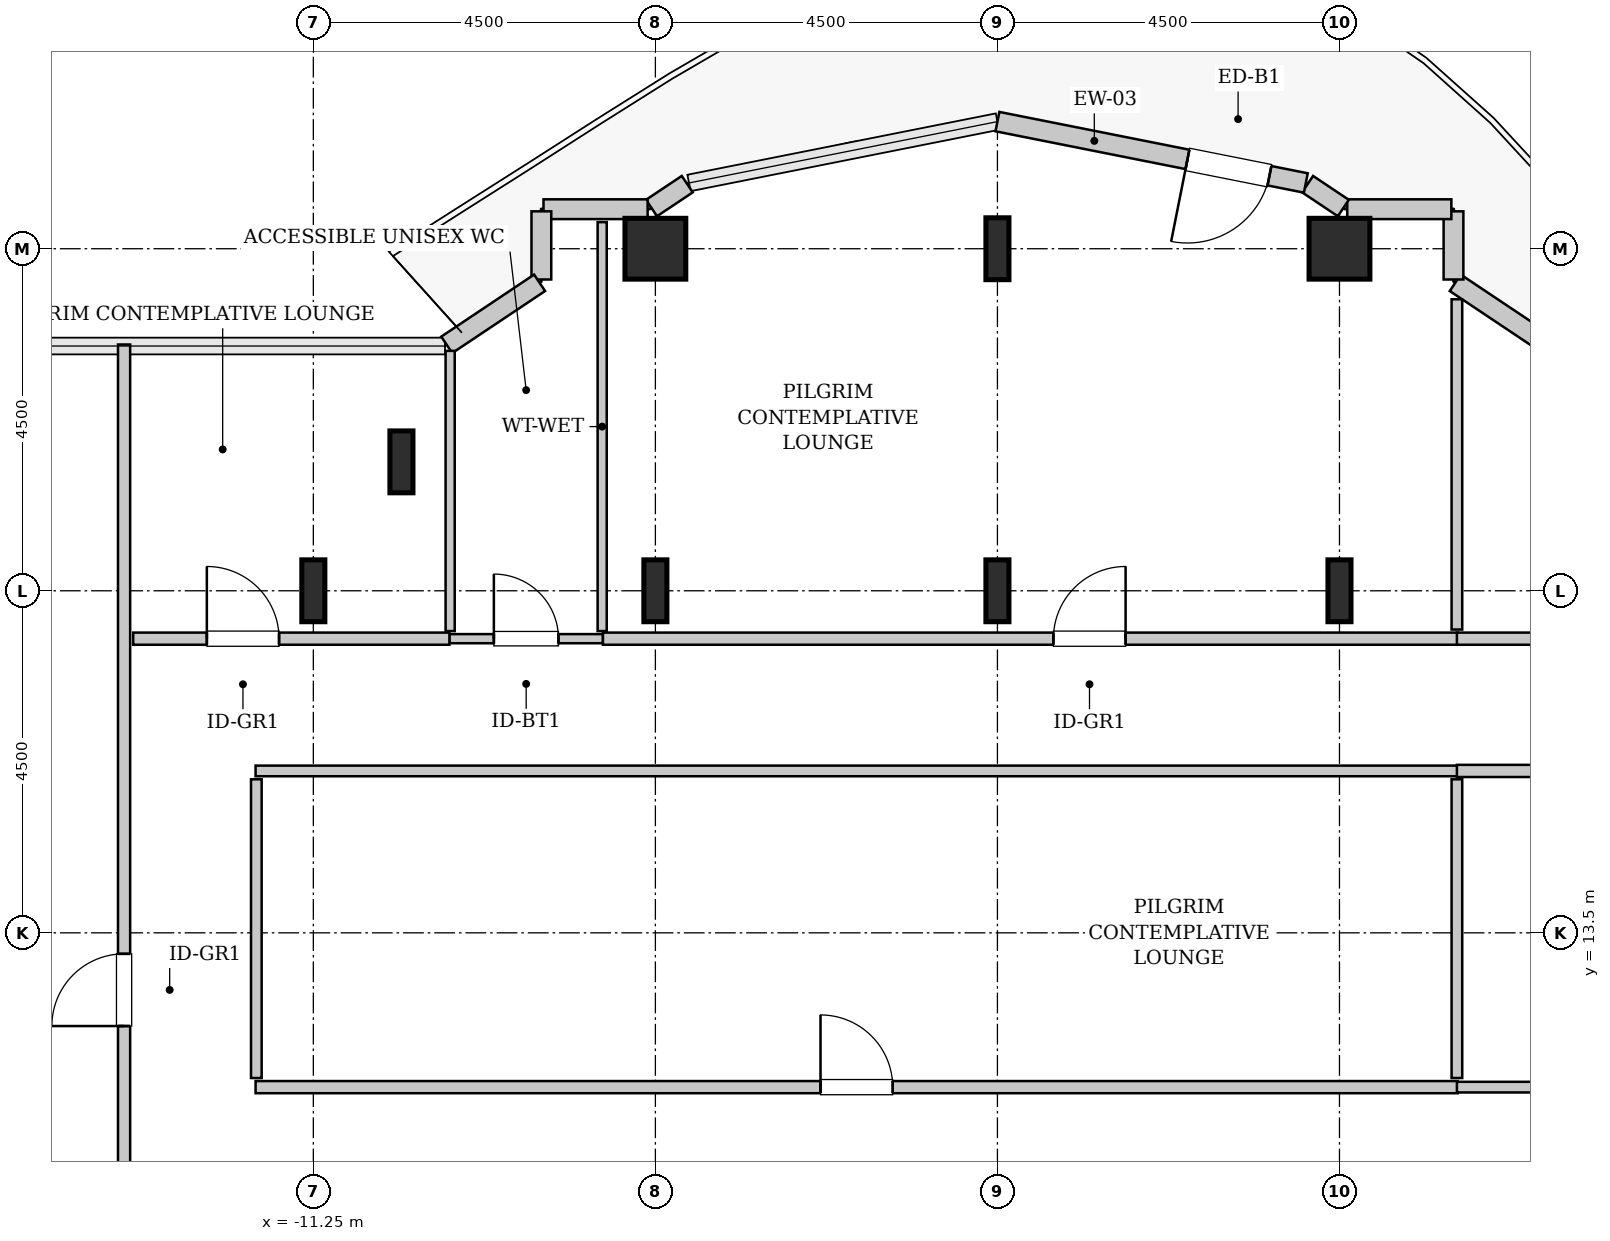
"""IFC4 building model, lengths in metres.
Left out: names, types, materials, properties, quantities, classifications, styles, units other than length and angle.
Written with IfcOpenShell. Run it as: python <this file> out.ifc"""

import sys

from ifc_helpers import new_model, si_unit, direction, frame, frame_2d, origin, origin_2d, place, context, subcontext, project, spatial, rectangle, hollow_rectangle, i_section, extrude, source, transform, mapped, element, fill, save


model = new_model("IFC4")
c1 = context("Model", 3, precision=1e-05, world=origin(), true_north=direction((0.0, 1.0)))
c2 = subcontext(c1, "Body", "Model", "MODEL_VIEW")
j1 = project(units=[si_unit("LENGTHUNIT", "METRE"), si_unit("PLANEANGLEUNIT", "RADIAN")], contexts=[c1])
p1 = place(None, origin())
s1 = spatial("IfcSite", under=j1, at=p1, CompositionType="ELEMENT")
p2 = place(p1, origin())
s2 = spatial("IfcBuilding", under=s1, at=p2, CompositionType="ELEMENT")
p3 = place(p2, frame((0.0, 0.0, 194.4)))
s3 = spatial("IfcBuildingStorey", under=s2, at=p3, CompositionType="ELEMENT", Elevation=194.4)
m1 = source(origin(), c2, "Body", "SweptSolid", [
    extrude(i_section(OverallWidth=0.303, OverallDepth=0.814, WebThickness=0.021, FlangeThickness=0.04, FilletRadius=0.03, at=origin_2d()), origin(), (0.0, 0.0, 1.0), 3.8),
])
for number, where, z_axis, x_axis in (
    (1, (-11.25, 18.0, 0.0), (0.0, 0.0, 1.0), (1.0, 0.0, 0.0)),
    (2, (-10.091, 19.696, 0.0), (0.0, 0.0, 1.0), (1.0, 0.0, 0.0)),
    (3, (-6.75, 18.0, 0.0), (0.0, 0.0, 1.0), (1.0, 0.0, 0.0)),
):
    element("IfcColumn", number, at=place(p3, frame(where, z_axis=z_axis, x_axis=x_axis)), inside=s3, PredefinedType="COLUMN", context=c2, shape_type="MappedRepresentation", body=[
        mapped(m1, transform((0.0, 0.0, 0.0), x_axis=(1.0, 0.0, 0.0), y_axis=(0.0, 1.0, 0.0), z_axis=(0.0, 0.0, 1.0), scale=1.0)),
    ])
m2 = source(origin(), c2, "Body", "SweptSolid", [
    extrude(hollow_rectangle(XDim=0.8, YDim=0.8, WallThickness=0.04, InnerFilletRadius=0.04, OuterFilletRadius=0.08, at=origin_2d()), origin(), (0.0, 0.0, 1.0), 3.8),
])
p4 = place(p3, frame((-6.75, 22.5, 0.0), z_axis=(0.0, 0.0, 1.0), x_axis=(1.0, 0.0, 0.0)))
e4 = element("IfcColumn", 4, at=p4, inside=s3, PredefinedType="COLUMN", context=c2, shape_type="MappedRepresentation", body=[
    mapped(m2, transform((0.0, 0.0, 0.0), x_axis=(1.0, 0.0, 0.0), y_axis=(0.0, 1.0, 0.0), z_axis=(0.0, 0.0, 1.0), scale=1.0)),
])
for number, where, z_axis, x_axis in (
    (5, (-2.25, 18.0, 0.0), (0.0, 0.0, 1.0), (1.0, 0.0, 0.0)),
    (6, (-2.25, 22.5, 0.0), (0.0, 0.0, 1.0), (1.0, 0.0, 0.0)),
    (7, (2.25, 18.0, 0.0), (0.0, 0.0, 1.0), (1.0, 0.0, 0.0)),
):
    element("IfcColumn", number, at=place(p3, frame(where, z_axis=z_axis, x_axis=x_axis)), inside=s3, PredefinedType="COLUMN", context=c2, shape_type="MappedRepresentation", body=[
        mapped(m1, transform((0.0, 0.0, 0.0), x_axis=(1.0, 0.0, 0.0), y_axis=(0.0, 1.0, 0.0), z_axis=(0.0, 0.0, 1.0), scale=1.0)),
    ])
p5 = place(p3, frame((2.25, 22.5, 0.0), z_axis=(0.0, 0.0, 1.0), x_axis=(1.0, 0.0, 0.0)))
e8 = element("IfcColumn", 8, at=p5, inside=s3, PredefinedType="COLUMN", context=c2, shape_type="MappedRepresentation", body=[
    mapped(m2, transform((0.0, 0.0, 0.0), x_axis=(1.0, 0.0, 0.0), y_axis=(0.0, 1.0, 0.0), z_axis=(0.0, 0.0, 1.0), scale=1.0)),
])
m3 = source(origin(), c2, "Body", "SweptSolid", [
    extrude(rectangle(XDim=1.469, YDim=0.26, at=frame_2d((0.734, 0.0))), origin(), (0.0, 0.0, 1.0), 3.55),
])
p6 = place(p3, frame((4.995, 21.236, 0.0), z_axis=(0.0, 0.0, 1.0), x_axis=(-0.831461760506, 0.555581983884, 0.0)))
e9 = element("IfcWall", 9, at=p6, inside=s3, PredefinedType="SOLIDWALL", context=c2, shape_type="MappedRepresentation", body=[
    mapped(m3, transform((0.0, 0.0, 0.0), x_axis=(1.0, 0.0, 0.0), y_axis=(0.0, 1.0, 0.0), z_axis=(0.0, 0.0, 1.0), scale=1.0)),
])
m4 = source(origin(), c2, "Body", "SweptSolid", [
    extrude(rectangle(XDim=0.897, YDim=0.26, at=frame_2d((0.448, 0.0))), origin(), (0.0, 0.0, 1.0), 3.55),
])
p7 = place(p3, frame((3.75, 22.095, 0.0), z_axis=(0.0, 0.0, 1.0), x_axis=(0.0, 1.0, 0.0)))
e10 = element("IfcWall", 10, at=p7, inside=s3, PredefinedType="SOLIDWALL", context=c2, shape_type="MappedRepresentation", body=[
    mapped(m4, transform((0.0, 0.0, 0.0), x_axis=(1.0, 0.0, 0.0), y_axis=(0.0, 1.0, 0.0), z_axis=(0.0, 0.0, 1.0), scale=1.0)),
])
m5 = source(origin(), c2, "Body", "SweptSolid", [
    extrude(rectangle(XDim=1.37, YDim=0.26, at=frame_2d((0.685, 0.0))), origin(), (0.0, 0.0, 1.0), 3.55),
])
p8 = place(p3, frame((3.722, 23.02, 0.0), z_axis=(0.0, 0.0, 1.0), x_axis=(-1.0, 0.0, 0.0)))
e11 = element("IfcWall", 11, at=p8, inside=s3, PredefinedType="SOLIDWALL", context=c2, shape_type="MappedRepresentation", body=[
    mapped(m5, transform((0.0, 0.0, 0.0), x_axis=(1.0, 0.0, 0.0), y_axis=(0.0, 1.0, 0.0), z_axis=(0.0, 0.0, 1.0), scale=1.0)),
])
m6 = source(origin(), c2, "Body", "SweptSolid", [
    extrude(rectangle(XDim=0.565, YDim=0.26, at=frame_2d((0.283, 0.0))), origin(), (0.0, 0.0, 1.0), 3.55),
])
p9 = place(p3, frame((2.301, 23.036, 0.0), z_axis=(0.0, 0.0, 1.0), x_axis=(-0.831651492666, 0.555297933317, 0.0)))
e12 = element("IfcWall", 12, at=p9, inside=s3, PredefinedType="SOLIDWALL", context=c2, shape_type="MappedRepresentation", body=[
    mapped(m6, transform((0.0, 0.0, 0.0), x_axis=(1.0, 0.0, 0.0), y_axis=(0.0, 1.0, 0.0), z_axis=(0.0, 0.0, 1.0), scale=1.0)),
])
m7 = source(origin(), c2, "Body", "SweptSolid", [
    extrude(rectangle(XDim=4.137, YDim=0.26, at=frame_2d((2.068, 0.0))), origin(), (0.0, 0.0, 1.0), 3.55),
])
p10 = place(p3, frame((1.807, 23.365, 0.0), z_axis=(0.0, 0.0, 1.0), x_axis=(-0.980782170794, 0.195105954428, 0.0)))
e13 = element("IfcWall", 13, at=p10, inside=s3, PredefinedType="SOLIDWALL", context=c2, shape_type="MappedRepresentation", body=[
    mapped(m7, transform((0.0, 0.0, 0.0), x_axis=(1.0, 0.0, 0.0), y_axis=(0.0, 1.0, 0.0), z_axis=(0.0, 0.0, 1.0), scale=1.0)),
])
p11 = place(p10, frame((0.488, 0.0, 0.0)))
e14 = element("IfcOpeningElement", 14, at=p11, cuts=e13, PredefinedType="OPENING", context=c2, shape_type="SweptSolid", body=[
    extrude(rectangle(XDim=1.1, YDim=2.2, at=frame_2d((0.55, 1.1))), frame((0.0, 0.14, 0.0), z_axis=(0.0, -1.0, 0.0), x_axis=(1.0, 0.0, 0.0)), (0.0, 0.0, 1.0), 0.28),
])
p12 = place(p3, frame((-6.331, 23.35, 0.0), z_axis=(0.0, 0.0, 1.0), x_axis=(-0.831651492666, -0.555297933317, 0.0)))
e15 = element("IfcWall", 15, at=p12, inside=s3, PredefinedType="SOLIDWALL", context=c2, shape_type="MappedRepresentation", body=[
    mapped(m6, transform((0.0, 0.0, 0.0), x_axis=(1.0, 0.0, 0.0), y_axis=(0.0, 1.0, 0.0), z_axis=(0.0, 0.0, 1.0), scale=1.0)),
])
p13 = place(p3, frame((-6.852, 23.02, 0.0), z_axis=(0.0, 0.0, 1.0), x_axis=(-1.0, 0.0, 0.0)))
e16 = element("IfcWall", 16, at=p13, inside=s3, PredefinedType="SOLIDWALL", context=c2, shape_type="MappedRepresentation", body=[
    mapped(m5, transform((0.0, 0.0, 0.0), x_axis=(1.0, 0.0, 0.0), y_axis=(0.0, 1.0, 0.0), z_axis=(0.0, 0.0, 1.0), scale=1.0)),
])
p14 = place(p3, frame((-8.25, 22.992, 0.0), z_axis=(0.0, 0.0, 1.0), x_axis=(0.0, -1.0, 0.0)))
e17 = element("IfcWall", 17, at=p14, inside=s3, PredefinedType="SOLIDWALL", context=c2, shape_type="MappedRepresentation", body=[
    mapped(m4, transform((0.0, 0.0, 0.0), x_axis=(1.0, 0.0, 0.0), y_axis=(0.0, 1.0, 0.0), z_axis=(0.0, 0.0, 1.0), scale=1.0)),
])
p15 = place(p3, frame((-8.273, 22.052, 0.0), z_axis=(0.0, 0.0, 1.0), x_axis=(-0.831461760506, -0.555581983884, 0.0)))
e18 = element("IfcWall", 18, at=p15, inside=s3, PredefinedType="SOLIDWALL", context=c2, shape_type="MappedRepresentation", body=[
    mapped(m3, transform((0.0, 0.0, 0.0), x_axis=(1.0, 0.0, 0.0), y_axis=(0.0, 1.0, 0.0), z_axis=(0.0, 0.0, 1.0), scale=1.0)),
])
m8 = source(origin(), c2, "Body", "SweptSolid", [
    extrude(rectangle(XDim=2.02, YDim=0.12, at=frame_2d((1.01, 0.0))), origin(), (0.0, 0.0, 1.0), 3.535),
])
p16 = place(p3, frame((-9.46, 17.37, 0.0), z_axis=(0.0, 0.0, 1.0), x_axis=(1.0, 0.0, 0.0)))
e19 = element("IfcWall", 19, at=p16, inside=s3, PredefinedType="PLUMBINGWALL", context=c2, shape_type="MappedRepresentation", body=[
    mapped(m8, transform((0.0, 0.0, 0.0), x_axis=(1.0, 0.0, 0.0), y_axis=(0.0, 1.0, 0.0), z_axis=(0.0, 0.0, 1.0), scale=1.0)),
])
p17 = place(p16, frame((0.585, 0.0, 0.0)))
e20 = element("IfcOpeningElement", 20, at=p17, cuts=e19, PredefinedType="OPENING", context=c2, shape_type="SweptSolid", body=[
    extrude(rectangle(XDim=0.85, YDim=2.1, at=frame_2d((0.425, 1.05))), frame((0.0, 0.07, 0.0), z_axis=(0.0, -1.0, 0.0), x_axis=(1.0, 0.0, 0.0)), (0.0, 0.0, 1.0), 0.14),
])
m9 = source(origin(), c2, "Body", "SweptSolid", [
    extrude(rectangle(XDim=5.38, YDim=0.12, at=frame_2d((2.69, 0.0))), origin(), (0.0, 0.0, 1.0), 3.535),
])
p18 = place(p3, frame((-7.45, 17.47, 0.0), z_axis=(0.0, 0.0, 1.0), x_axis=(0.0, 1.0, 0.0)))
e21 = element("IfcWall", 21, at=p18, inside=s3, PredefinedType="PLUMBINGWALL", context=c2, shape_type="MappedRepresentation", body=[
    mapped(m9, transform((0.0, 0.0, 0.0), x_axis=(1.0, 0.0, 0.0), y_axis=(0.0, 1.0, 0.0), z_axis=(0.0, 0.0, 1.0), scale=1.0)),
])
m10 = source(origin(), c2, "Body", "SweptSolid", [
    extrude(rectangle(XDim=3.687, YDim=0.12, at=frame_2d((1.843, 0.0))), origin(), (0.0, 0.0, 1.0), 3.535),
])
p19 = place(p3, frame((-9.45, 17.47, 0.0), z_axis=(0.0, 0.0, 1.0), x_axis=(0.0, 1.0, 0.0)))
e22 = element("IfcWall", 22, at=p19, inside=s3, PredefinedType="PLUMBINGWALL", context=c2, shape_type="MappedRepresentation", body=[
    mapped(m10, transform((0.0, 0.0, 0.0), x_axis=(1.0, 0.0, 0.0), y_axis=(0.0, 1.0, 0.0), z_axis=(0.0, 0.0, 1.0), scale=1.0)),
])
m11 = source(origin(), c2, "Body", "SweptSolid", [
    extrude(rectangle(XDim=13.153, YDim=0.16, at=frame_2d((6.576, 0.0))), origin(), (0.0, 0.0, 1.0), 3.535),
])
p20 = place(p3, frame((-13.74, 8.087, 0.0), z_axis=(0.0, 0.0, 1.0), x_axis=(0.0, 1.0, 0.0)))
e23 = element("IfcWall", 23, at=p20, inside=s3, PredefinedType="PARTITIONING", context=c2, shape_type="MappedRepresentation", body=[
    mapped(m11, transform((0.0, 0.0, 0.0), x_axis=(1.0, 0.0, 0.0), y_axis=(0.0, 1.0, 0.0), z_axis=(0.0, 0.0, 1.0), scale=1.0)),
])
p21 = place(p20, frame((4.186, 0.0, 0.0)))
e24 = element("IfcOpeningElement", 24, at=p21, cuts=e23, PredefinedType="OPENING", context=c2, shape_type="SweptSolid", body=[
    extrude(rectangle(XDim=0.95, YDim=2.1, at=frame_2d((0.475, 1.05))), frame((0.0, 0.09, 0.0), z_axis=(0.0, -1.0, 0.0), x_axis=(1.0, 0.0, 0.0)), (0.0, 0.0, 1.0), 0.18),
])
m12 = source(origin(), c2, "Body", "SweptSolid", [
    extrude(rectangle(XDim=15.815, YDim=0.16, at=frame_2d((7.907, 0.0))), origin(), (0.0, 0.0, 1.0), 3.535),
])
p22 = place(p3, frame((-12.01, 11.47, 0.0), z_axis=(0.0, 0.0, 1.0), x_axis=(1.0, 0.0, 0.0)))
e25 = element("IfcWall", 25, at=p22, inside=s3, PredefinedType="PARTITIONING", context=c2, shape_type="MappedRepresentation", body=[
    mapped(m12, transform((0.0, 0.0, 0.0), x_axis=(1.0, 0.0, 0.0), y_axis=(0.0, 1.0, 0.0), z_axis=(0.0, 0.0, 1.0), scale=1.0)),
])
p23 = place(p22, frame((7.433, 0.0, 0.0)))
e26 = element("IfcOpeningElement", 26, at=p23, cuts=e25, PredefinedType="OPENING", context=c2, shape_type="SweptSolid", body=[
    extrude(rectangle(XDim=0.95, YDim=2.1, at=frame_2d((0.475, 1.05))), frame((0.0, 0.09, 0.0), z_axis=(0.0, -1.0, 0.0), x_axis=(1.0, 0.0, 0.0)), (0.0, 0.0, 1.0), 0.18),
])
m13 = source(origin(), c2, "Body", "SweptSolid", [
    extrude(rectangle(XDim=15.815, YDim=0.14, at=frame_2d((7.907, 0.0))), origin(), (0.0, 0.0, 1.0), 3.535),
])
p24 = place(p3, frame((-12.01, 15.63, 0.0), z_axis=(0.0, 0.0, 1.0), x_axis=(1.0, 0.0, 0.0)))
e27 = element("IfcWall", 27, at=p24, inside=s3, PredefinedType="PARTITIONING", context=c2, shape_type="MappedRepresentation", body=[
    mapped(m13, transform((0.0, 0.0, 0.0), x_axis=(1.0, 0.0, 0.0), y_axis=(0.0, 1.0, 0.0), z_axis=(0.0, 0.0, 1.0), scale=1.0)),
])
m14 = source(origin(), c2, "Body", "SweptSolid", [
    extrude(rectangle(XDim=3.93, YDim=0.14, at=frame_2d((1.965, 0.0))), origin(), (0.0, 0.0, 1.0), 3.535),
])
for number, where, z_axis, x_axis in (
    (28, (-12.0, 11.59, 0.0), (0.0, 0.0, 1.0), (0.0, 1.0, 0.0)),
    (29, (3.795, 11.59, 0.0), (0.0, 0.0, 1.0), (0.0, 1.0, 0.0)),
):
    element("IfcWall", number, at=place(p3, frame(where, z_axis=z_axis, x_axis=x_axis)), inside=s3, PredefinedType="PARTITIONING", context=c2, shape_type="MappedRepresentation", body=[
        mapped(m14, transform((0.0, 0.0, 0.0), x_axis=(1.0, 0.0, 0.0), y_axis=(0.0, 1.0, 0.0), z_axis=(0.0, 0.0, 1.0), scale=1.0)),
    ])
m15 = source(origin(), c2, "Body", "SweptSolid", [
    extrude(rectangle(XDim=11.245, YDim=0.16, at=frame_2d((5.623, 0.0))), origin(), (0.0, 0.0, 1.0), 3.535),
])
p25 = place(p3, frame((-7.44, 17.37, 0.0), z_axis=(0.0, 0.0, 1.0), x_axis=(1.0, 0.0, 0.0)))
e30 = element("IfcWall", 30, at=p25, inside=s3, PredefinedType="PARTITIONING", context=c2, shape_type="MappedRepresentation", body=[
    mapped(m15, transform((0.0, 0.0, 0.0), x_axis=(1.0, 0.0, 0.0), y_axis=(0.0, 1.0, 0.0), z_axis=(0.0, 0.0, 1.0), scale=1.0)),
])
p26 = place(p25, frame((5.926, 0.0, 0.0)))
e31 = element("IfcOpeningElement", 31, at=p26, cuts=e30, PredefinedType="OPENING", context=c2, shape_type="SweptSolid", body=[
    extrude(rectangle(XDim=0.95, YDim=2.1, at=frame_2d((0.475, 1.05))), frame((0.0, 0.09, 0.0), z_axis=(0.0, -1.0, 0.0), x_axis=(1.0, 0.0, 0.0)), (0.0, 0.0, 1.0), 0.18),
])
m16 = source(origin(), c2, "Body", "SweptSolid", [
    extrude(rectangle(XDim=4.345, YDim=0.14, at=frame_2d((2.173, 0.0))), origin(), (0.0, 0.0, 1.0), 3.535),
])
p27 = place(p3, frame((3.795, 17.49, 0.0), z_axis=(0.0, 0.0, 1.0), x_axis=(0.0, 1.0, 0.0)))
e32 = element("IfcWall", 32, at=p27, inside=s3, PredefinedType="PARTITIONING", context=c2, shape_type="MappedRepresentation", body=[
    mapped(m16, transform((0.0, 0.0, 0.0), x_axis=(1.0, 0.0, 0.0), y_axis=(0.0, 1.0, 0.0), z_axis=(0.0, 0.0, 1.0), scale=1.0)),
])
m17 = source(origin(), c2, "Body", "SweptSolid", [
    extrude(rectangle(XDim=4.16, YDim=0.16, at=frame_2d((2.08, 0.0))), origin(), (0.0, 0.0, 1.0), 3.535),
])
p28 = place(p3, frame((-13.62, 17.37, 0.0), z_axis=(0.0, 0.0, 1.0), x_axis=(1.0, 0.0, 0.0)))
e33 = element("IfcWall", 33, at=p28, inside=s3, PredefinedType="PARTITIONING", context=c2, shape_type="MappedRepresentation", body=[
    mapped(m17, transform((0.0, 0.0, 0.0), x_axis=(1.0, 0.0, 0.0), y_axis=(0.0, 1.0, 0.0), z_axis=(0.0, 0.0, 1.0), scale=1.0)),
])
p29 = place(p28, frame((0.969, 0.0, 0.0)))
e34 = element("IfcOpeningElement", 34, at=p29, cuts=e33, PredefinedType="OPENING", context=c2, shape_type="SweptSolid", body=[
    extrude(rectangle(XDim=0.95, YDim=2.1, at=frame_2d((0.475, 1.05))), frame((0.0, 0.09, 0.0), z_axis=(0.0, -1.0, 0.0), x_axis=(1.0, 0.0, 0.0)), (0.0, 0.0, 1.0), 0.18),
])
m18 = source(origin(), c2, "Body", "SweptSolid", [
    extrude(rectangle(XDim=9.825, YDim=0.16, at=frame_2d((4.913, 0.0))), origin(), (0.0, 0.0, 1.0), 3.535),
])
p30 = place(p3, frame((3.795, 17.37, 0.0), z_axis=(0.0, 0.0, 1.0), x_axis=(1.0, 0.0, 0.0)))
e35 = element("IfcWall", 35, at=p30, inside=s3, PredefinedType="PARTITIONING", context=c2, shape_type="MappedRepresentation", body=[
    mapped(m18, transform((0.0, 0.0, 0.0), x_axis=(1.0, 0.0, 0.0), y_axis=(0.0, 1.0, 0.0), z_axis=(0.0, 0.0, 1.0), scale=1.0)),
])
p31 = place(p30, frame((4.438, 0.0, 0.0)))
e36 = element("IfcOpeningElement", 36, at=p31, cuts=e35, PredefinedType="OPENING", context=c2, shape_type="SweptSolid", body=[
    extrude(rectangle(XDim=0.95, YDim=2.1, at=frame_2d((0.475, 1.05))), frame((0.0, 0.09, 0.0), z_axis=(0.0, -1.0, 0.0), x_axis=(1.0, 0.0, 0.0)), (0.0, 0.0, 1.0), 0.18),
])
m19 = source(origin(), c2, "Body", "SweptSolid", [
    extrude(rectangle(XDim=8.215, YDim=0.16, at=frame_2d((4.107, 0.0))), origin(), (0.0, 0.0, 1.0), 3.535),
])
p32 = place(p3, frame((3.795, 15.63, 0.0), z_axis=(0.0, 0.0, 1.0), x_axis=(1.0, 0.0, 0.0)))
e37 = element("IfcWall", 37, at=p32, inside=s3, PredefinedType="PARTITIONING", context=c2, shape_type="MappedRepresentation", body=[
    mapped(m19, transform((0.0, 0.0, 0.0), x_axis=(1.0, 0.0, 0.0), y_axis=(0.0, 1.0, 0.0), z_axis=(0.0, 0.0, 1.0), scale=1.0)),
])
p33 = place(p32, frame((3.633, 0.0, 0.0)))
e38 = element("IfcOpeningElement", 38, at=p33, cuts=e37, PredefinedType="OPENING", context=c2, shape_type="SweptSolid", body=[
    extrude(rectangle(XDim=0.95, YDim=2.1, at=frame_2d((0.475, 1.05))), frame((0.0, 0.09, 0.0), z_axis=(0.0, -1.0, 0.0), x_axis=(1.0, 0.0, 0.0)), (0.0, 0.0, 1.0), 0.18),
])
m20 = source(origin(), c2, "Body", "SweptSolid", [
    extrude(rectangle(XDim=8.215, YDim=0.14, at=frame_2d((4.107, 0.0))), origin(), (0.0, 0.0, 1.0), 3.535),
])
p34 = place(p3, frame((3.795, 11.47, 0.0), z_axis=(0.0, 0.0, 1.0), x_axis=(1.0, 0.0, 0.0)))
e39 = element("IfcWall", 39, at=p34, inside=s3, PredefinedType="PARTITIONING", context=c2, shape_type="MappedRepresentation", body=[
    mapped(m20, transform((0.0, 0.0, 0.0), x_axis=(1.0, 0.0, 0.0), y_axis=(0.0, 1.0, 0.0), z_axis=(0.0, 0.0, 1.0), scale=1.0)),
])
m21 = source(origin(), c2, "Body", "SweptSolid", [
    extrude(rectangle(XDim=1.1, YDim=2.2, at=frame_2d((0.55, 1.1))), frame((0.0, 0.025, 0.0), z_axis=(0.0, -1.0, 0.0), x_axis=(1.0, 0.0, 0.0)), (0.0, 0.0, 1.0), 0.05),
])
p35 = place(p11, origin())
e40 = element("IfcDoor", 40, at=p35, inside=s3, OperationType="SINGLE_SWING_RIGHT", PredefinedType="DOOR", context=c2, shape_type="MappedRepresentation", body=[
    mapped(m21, transform((0.0, 0.0, 0.0), x_axis=(1.0, 0.0, 0.0), y_axis=(0.0, 1.0, 0.0), z_axis=(0.0, 0.0, 1.0), scale=1.0)),
])
fill(e14, e40)
m22 = source(origin(), c2, "Body", "SweptSolid", [
    extrude(rectangle(XDim=0.85, YDim=2.1, at=frame_2d((0.425, 1.05))), frame((0.0, 0.025, 0.0), z_axis=(0.0, -1.0, 0.0), x_axis=(1.0, 0.0, 0.0)), (0.0, 0.0, 1.0), 0.05),
])
p36 = place(p17, origin())
e41 = element("IfcDoor", 41, at=p36, inside=s3, OperationType="SINGLE_SWING_LEFT", PredefinedType="DOOR", context=c2, shape_type="MappedRepresentation", body=[
    mapped(m22, transform((0.0, 0.0, 0.0), x_axis=(1.0, 0.0, 0.0), y_axis=(0.0, 1.0, 0.0), z_axis=(0.0, 0.0, 1.0), scale=1.0)),
])
fill(e20, e41)
m23 = source(origin(), c2, "Body", "SweptSolid", [
    extrude(rectangle(XDim=0.95, YDim=2.1, at=frame_2d((0.475, 1.05))), frame((0.0, 0.025, 0.0), z_axis=(0.0, -1.0, 0.0), x_axis=(1.0, 0.0, 0.0)), (0.0, 0.0, 1.0), 0.05),
])
p37 = place(p21, origin())
e42 = element("IfcDoor", 42, at=p37, inside=s3, OperationType="SINGLE_SWING_LEFT", PredefinedType="DOOR", context=c2, shape_type="MappedRepresentation", body=[
    mapped(m23, transform((0.0, 0.0, 0.0), x_axis=(1.0, 0.0, 0.0), y_axis=(0.0, 1.0, 0.0), z_axis=(0.0, 0.0, 1.0), scale=1.0)),
])
fill(e24, e42)
p38 = place(p23, origin())
e43 = element("IfcDoor", 43, at=p38, inside=s3, OperationType="SINGLE_SWING_LEFT", PredefinedType="DOOR", context=c2, shape_type="MappedRepresentation", body=[
    mapped(m23, transform((0.0, 0.0, 0.0), x_axis=(1.0, 0.0, 0.0), y_axis=(0.0, 1.0, 0.0), z_axis=(0.0, 0.0, 1.0), scale=1.0)),
])
fill(e26, e43)
p39 = place(p26, origin())
e44 = element("IfcDoor", 44, at=p39, inside=s3, OperationType="SINGLE_SWING_RIGHT", PredefinedType="DOOR", context=c2, shape_type="MappedRepresentation", body=[
    mapped(m23, transform((0.0, 0.0, 0.0), x_axis=(1.0, 0.0, 0.0), y_axis=(0.0, 1.0, 0.0), z_axis=(0.0, 0.0, 1.0), scale=1.0)),
])
fill(e31, e44)
p40 = place(p29, origin())
e45 = element("IfcDoor", 45, at=p40, inside=s3, OperationType="SINGLE_SWING_LEFT", PredefinedType="DOOR", context=c2, shape_type="MappedRepresentation", body=[
    mapped(m23, transform((0.0, 0.0, 0.0), x_axis=(1.0, 0.0, 0.0), y_axis=(0.0, 1.0, 0.0), z_axis=(0.0, 0.0, 1.0), scale=1.0)),
])
fill(e34, e45)
save(model, sys.argv[1])
